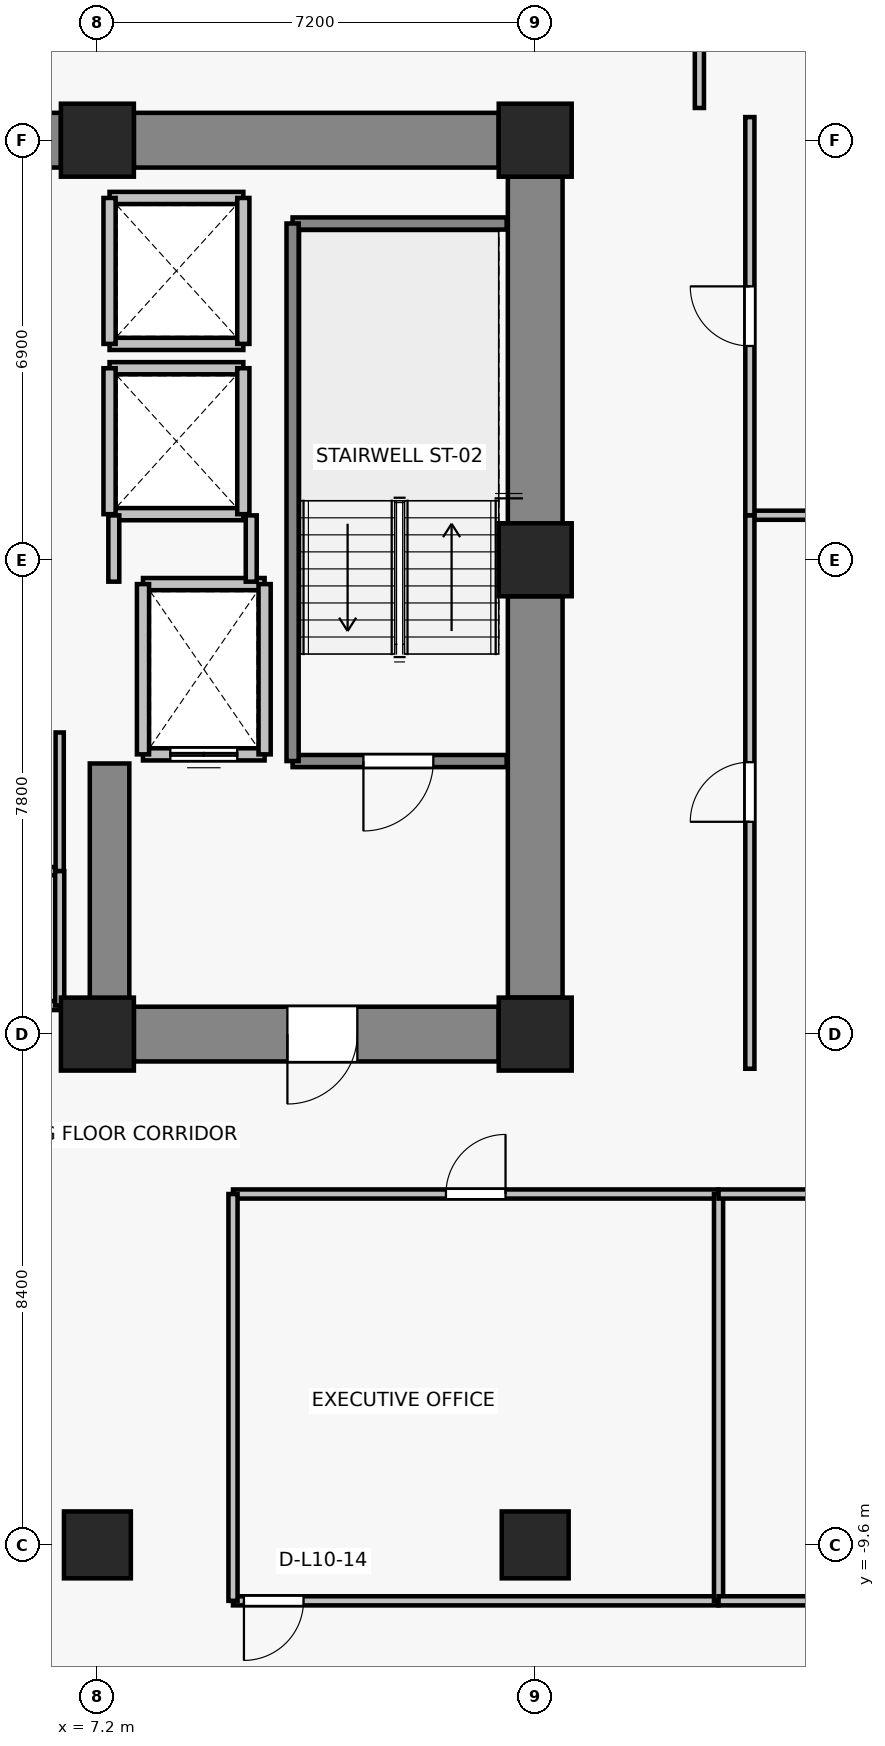
"""IFC4 building model, lengths in metres.
Left out: names, types, materials, properties, quantities, classifications, styles, units other than length and angle.
Written with IfcOpenShell. Run it as: python <this file> out.ifc"""

import sys

from ifc_helpers import new_model, si_unit, direction, frame, frame_2d, origin, origin_2d, place, context, subcontext, project, spatial, rectangle, extrude, source, transform, mapped, element, fill, save


model = new_model("IFC4")
c1 = context("Model", 3, precision=1e-05, world=origin(), true_north=direction((0.0, 1.0)))
c2 = subcontext(c1, "Body", "Model", "MODEL_VIEW")
j1 = project(units=[si_unit("LENGTHUNIT", "METRE"), si_unit("PLANEANGLEUNIT", "RADIAN")], contexts=[c1])
p1 = place(None, origin())
s1 = spatial("IfcSite", under=j1, at=p1, CompositionType="ELEMENT")
p2 = place(p1, origin())
s2 = spatial("IfcBuilding", under=s1, at=p2, CompositionType="ELEMENT")
p3 = place(p2, frame((0.0, 0.0, 40.6)))
s3 = spatial("IfcBuildingStorey", under=s2, at=p3, CompositionType="ELEMENT", Elevation=40.6)
for number, where, z_axis, x_axis in (
    (1, (7.2, -1.2, 0.0), (0.0, 0.0, 1.0), (1.0, 0.0, 0.0)),
    (2, (14.4, -1.2, 0.0), (0.0, 0.0, 1.0), (1.0, 0.0, 0.0)),
    (3, (14.4, 6.6, 0.0), (0.0, 0.0, 1.0), (1.0, 0.0, 0.0)),
    (4, (7.2, 13.5, 0.0), (0.0, 0.0, 1.0), (1.0, 0.0, 0.0)),
    (5, (14.4, 13.5, 0.0), (0.0, 0.0, 1.0), (1.0, 0.0, 0.0)),
):
    element("IfcColumn", number, at=place(p3, frame(where, z_axis=z_axis, x_axis=x_axis)), inside=s3, PredefinedType="COLUMN", context=c2, shape_type="SweptSolid", body=[
        extrude(rectangle(XDim=1.2, YDim=1.2, at=origin_2d()), origin(), (0.0, 0.0, 1.0), 3.3),
    ])
for number, where, z_axis, x_axis in (
    (6, (7.2, -9.6, 0.0), (0.0, 0.0, 1.0), (1.0, 0.0, 0.0)),
    (7, (14.4, -9.6, 0.0), (0.0, 0.0, 1.0), (1.0, 0.0, 0.0)),
):
    element("IfcColumn", number, at=place(p3, frame(where, z_axis=z_axis, x_axis=x_axis)), inside=s3, PredefinedType="COLUMN", context=c2, shape_type="SweptSolid", body=[
        extrude(rectangle(XDim=1.1, YDim=1.1, at=origin_2d()), origin(), (0.0, 0.0, 1.0), 3.3),
    ])
p4 = place(p3, frame((-6.6, 13.5, 0.0), z_axis=(0.0, 0.0, 1.0), x_axis=(1.0, 0.0, 0.0)))
e8 = element("IfcWall", 8, at=p4, inside=s3, PredefinedType="SHEAR", context=c2, shape_type="SweptSolid", body=[
    extrude(rectangle(XDim=13.2, YDim=0.9, at=frame_2d((6.6, 0.0))), origin(), (0.0, 0.0, 1.0), 3.075),
])
p5 = place(p3, frame((7.8, 13.5, 0.0), z_axis=(0.0, 0.0, 1.0), x_axis=(1.0, 0.0, 0.0)))
e9 = element("IfcWall", 9, at=p5, inside=s3, PredefinedType="SHEAR", context=c2, shape_type="SweptSolid", body=[
    extrude(rectangle(XDim=6.0, YDim=0.9, at=frame_2d((3.0, 0.0))), origin(), (0.0, 0.0, 1.0), 3.075),
])
p6 = place(p3, frame((14.4, -0.6, 0.0), z_axis=(0.0, 0.0, 1.0), x_axis=(0.0, 1.0, 0.0)))
e10 = element("IfcWall", 10, at=p6, inside=s3, PredefinedType="SHEAR", context=c2, shape_type="SweptSolid", body=[
    extrude(rectangle(XDim=6.6, YDim=0.9, at=frame_2d((3.3, 0.0))), origin(), (0.0, 0.0, 1.0), 3.075),
])
p7 = place(p3, frame((14.4, 7.2, 0.0), z_axis=(0.0, 0.0, 1.0), x_axis=(0.0, 1.0, 0.0)))
e11 = element("IfcWall", 11, at=p7, inside=s3, PredefinedType="SHEAR", context=c2, shape_type="SweptSolid", body=[
    extrude(rectangle(XDim=5.7, YDim=0.9, at=frame_2d((2.85, 0.0))), origin(), (0.0, 0.0, 1.0), 3.075),
])
p8 = place(p3, frame((13.8, -1.2, 0.0), z_axis=(0.0, 0.0, 1.0), x_axis=(-1.0, 0.0, 0.0)))
e12 = element("IfcWall", 12, at=p8, inside=s3, PredefinedType="SHEAR", context=c2, shape_type="SweptSolid", body=[
    extrude(rectangle(XDim=6.0, YDim=0.9, at=frame_2d((3.0, 0.0))), origin(), (0.0, 0.0, 1.0), 3.075),
])
p9 = place(p8, frame((2.325, 0.0, 0.0)))
e13 = element("IfcOpeningElement", 13, at=p9, cuts=e12, PredefinedType="OPENING", context=c2, shape_type="SweptSolid", body=[
    extrude(rectangle(XDim=1.15, YDim=2.15, at=frame_2d((0.575, 1.075))), frame((0.0, 0.46, 0.0), z_axis=(0.0, -1.0, 0.0), x_axis=(1.0, 0.0, 0.0)), (0.0, 0.0, 1.0), 0.92),
])
p10 = place(p3, frame((7.4, -0.75, 0.0), z_axis=(0.0, 0.0, 1.0), x_axis=(0.0, 1.0, 0.0)))
e14 = element("IfcWall", 14, at=p10, inside=s3, PredefinedType="SHEAR", context=c2, shape_type="SweptSolid", body=[
    extrude(rectangle(XDim=4.0, YDim=0.65, at=frame_2d((2.0, 0.0))), origin(), (0.0, 0.0, 1.0), 3.075),
])
p11 = place(p3, frame((9.95, 3.4, 0.0), z_axis=(0.0, 0.0, 1.0), x_axis=(-1.0, 0.0, 0.0)))
e15 = element("IfcWall", 15, at=p11, inside=s3, PredefinedType="SOLIDWALL", context=c2, shape_type="SweptSolid", body=[
    extrude(rectangle(XDim=2.0, YDim=0.2, at=frame_2d((1.0, 0.0))), origin(), (0.0, 0.0, 1.0), 3.075),
])
p12 = place(p11, frame((0.45, 0.0, 0.0)))
e16 = element("IfcOpeningElement", 16, at=p12, cuts=e15, PredefinedType="OPENING", context=c2, shape_type="SweptSolid", body=[
    extrude(rectangle(XDim=1.1, YDim=2.2, at=frame_2d((0.55, 1.1))), frame((0.0, 0.11, 0.0), z_axis=(0.0, -1.0, 0.0), x_axis=(1.0, 0.0, 0.0)), (0.0, 0.0, 1.0), 0.22),
])
p13 = place(p3, frame((7.95, 6.2, 0.0), z_axis=(0.0, 0.0, 1.0), x_axis=(1.0, 0.0, 0.0)))
e17 = element("IfcWall", 17, at=p13, inside=s3, PredefinedType="SOLIDWALL", context=c2, shape_type="SweptSolid", body=[
    extrude(rectangle(XDim=2.0, YDim=0.2, at=frame_2d((1.0, 0.0))), origin(), (0.0, 0.0, 1.0), 3.075),
])
for number, where, z_axis, x_axis in (
    (18, (7.95, 3.4, 0.0), (0.0, 0.0, 1.0), (0.0, 1.0, 0.0)),
    (19, (9.95, 6.2, 0.0), (0.0, 0.0, 1.0), (0.0, -1.0, 0.0)),
):
    element("IfcWall", number, at=place(p3, frame(where, z_axis=z_axis, x_axis=x_axis)), inside=s3, PredefinedType="SOLIDWALL", context=c2, shape_type="SweptSolid", body=[
        extrude(rectangle(XDim=2.8, YDim=0.2, at=frame_2d((1.4, 0.0))), origin(), (0.0, 0.0, 1.0), 3.075),
    ])
for number, where, z_axis, x_axis in (
    (20, (9.6, 7.35, 0.0), (0.0, 0.0, 1.0), (-1.0, 0.0, 0.0)),
    (21, (7.4, 9.75, 0.0), (0.0, 0.0, 1.0), (1.0, 0.0, 0.0)),
):
    element("IfcWall", number, at=place(p3, frame(where, z_axis=z_axis, x_axis=x_axis)), inside=s3, PredefinedType="SOLIDWALL", context=c2, shape_type="SweptSolid", body=[
        extrude(rectangle(XDim=2.2, YDim=0.2, at=frame_2d((1.1, 0.0))), origin(), (0.0, 0.0, 1.0), 2.465),
    ])
p14 = place(p3, frame((7.4, 7.35, 0.0), z_axis=(0.0, 0.0, 1.0), x_axis=(0.0, 1.0, 0.0)))
e22 = element("IfcWall", 22, at=p14, inside=s3, PredefinedType="SOLIDWALL", context=c2, shape_type="SweptSolid", body=[
    extrude(rectangle(XDim=2.4, YDim=0.2, at=frame_2d((1.2, 0.0))), origin(), (0.0, 0.0, 1.0), 2.465),
])
p15 = place(p3, frame((9.6, 9.75, 0.0), z_axis=(0.0, 0.0, 1.0), x_axis=(0.0, -1.0, 0.0)))
e23 = element("IfcWall", 23, at=p15, inside=s3, PredefinedType="SOLIDWALL", context=c2, shape_type="SweptSolid", body=[
    extrude(rectangle(XDim=2.4, YDim=0.2, at=frame_2d((1.2, 0.0))), origin(), (0.0, 0.0, 1.0), 3.075),
])
for number, where, z_axis, x_axis in (
    (24, (9.6, 10.15, 0.0), (0.0, 0.0, 1.0), (-1.0, 0.0, 0.0)),
    (25, (7.4, 12.55, 0.0), (0.0, 0.0, 1.0), (1.0, 0.0, 0.0)),
):
    element("IfcWall", number, at=place(p3, frame(where, z_axis=z_axis, x_axis=x_axis)), inside=s3, PredefinedType="SOLIDWALL", context=c2, shape_type="SweptSolid", body=[
        extrude(rectangle(XDim=2.2, YDim=0.2, at=frame_2d((1.1, 0.0))), origin(), (0.0, 0.0, 1.0), 2.465),
    ])
p16 = place(p3, frame((7.4, 10.15, 0.0), z_axis=(0.0, 0.0, 1.0), x_axis=(0.0, 1.0, 0.0)))
e26 = element("IfcWall", 26, at=p16, inside=s3, PredefinedType="SOLIDWALL", context=c2, shape_type="SweptSolid", body=[
    extrude(rectangle(XDim=2.4, YDim=0.2, at=frame_2d((1.2, 0.0))), origin(), (0.0, 0.0, 1.0), 2.465),
])
p17 = place(p3, frame((9.6, 12.55, 0.0), z_axis=(0.0, 0.0, 1.0), x_axis=(0.0, -1.0, 0.0)))
e27 = element("IfcWall", 27, at=p17, inside=s3, PredefinedType="SOLIDWALL", context=c2, shape_type="SweptSolid", body=[
    extrude(rectangle(XDim=2.4, YDim=0.2, at=frame_2d((1.2, 0.0))), origin(), (0.0, 0.0, 1.0), 3.075),
])
p18 = place(p3, frame((13.93, 3.29, 0.0), z_axis=(0.0, 0.0, 1.0), x_axis=(-1.0, 0.0, 0.0)))
e28 = element("IfcWall", 28, at=p18, inside=s3, PredefinedType="SOLIDWALL", context=c2, shape_type="SweptSolid", body=[
    extrude(rectangle(XDim=3.52, YDim=0.2, at=frame_2d((1.76, 0.0))), origin(), (0.0, 0.0, 1.0), 3.075),
])
p19 = place(p18, frame((1.205, 0.0, 0.0)))
e29 = element("IfcOpeningElement", 29, at=p19, cuts=e28, PredefinedType="OPENING", context=c2, shape_type="SweptSolid", body=[
    extrude(rectangle(XDim=1.15, YDim=2.15, at=frame_2d((0.575, 1.075))), frame((0.0, 0.11, 0.0), z_axis=(0.0, -1.0, 0.0), x_axis=(1.0, 0.0, 0.0)), (0.0, 0.0, 1.0), 0.22),
])
p20 = place(p3, frame((10.41, 12.13, 0.0), z_axis=(0.0, 0.0, 1.0), x_axis=(1.0, 0.0, 0.0)))
e30 = element("IfcWall", 30, at=p20, inside=s3, PredefinedType="SOLIDWALL", context=c2, shape_type="SweptSolid", body=[
    extrude(rectangle(XDim=3.52, YDim=0.2, at=frame_2d((1.76, 0.0))), origin(), (0.0, 0.0, 1.0), 3.075),
])
p21 = place(p3, frame((10.41, 3.29, 0.0), z_axis=(0.0, 0.0, 1.0), x_axis=(0.0, 1.0, 0.0)))
e31 = element("IfcWall", 31, at=p21, inside=s3, PredefinedType="SOLIDWALL", context=c2, shape_type="SweptSolid", body=[
    extrude(rectangle(XDim=8.84, YDim=0.2, at=frame_2d((4.42, 0.0))), origin(), (0.0, 0.0, 1.0), 3.075),
])
p22 = place(p3, frame((7.47, 6.24, 0.0), z_axis=(0.0, 0.0, 1.0), x_axis=(0.0, 1.0, 0.0)))
e32 = element("IfcWall", 32, at=p22, inside=s3, PredefinedType="PARTITIONING", context=c2, shape_type="SweptSolid", body=[
    extrude(rectangle(XDim=1.09, YDim=0.18, at=frame_2d((0.545, 0.0))), origin(), (0.0, 0.0, 1.0), 2.465),
])
p23 = place(p3, frame((9.73, 7.33, 0.0), z_axis=(0.0, 0.0, 1.0), x_axis=(0.0, -1.0, 0.0)))
e33 = element("IfcWall", 33, at=p23, inside=s3, PredefinedType="PARTITIONING", context=c2, shape_type="SweptSolid", body=[
    extrude(rectangle(XDim=1.09, YDim=0.18, at=frame_2d((0.545, 0.0))), origin(), (0.0, 0.0, 1.0), 3.075),
])
p24 = place(p3, frame((6.58, 1.48, 0.0), z_axis=(0.0, 0.0, 1.0), x_axis=(-1.0, 0.0, 0.0)))
e34 = element("IfcWall", 34, at=p24, inside=s3, PredefinedType="PARTITIONING", context=c2, shape_type="SweptSolid", body=[
    extrude(rectangle(XDim=5.11, YDim=0.135, at=frame_2d((2.555, 0.0))), origin(), (0.0, 0.0, 1.0), 3.075),
])
p25 = place(p3, frame((6.58, 3.76, 0.0), z_axis=(0.0, 0.0, 1.0), x_axis=(0.0, -1.0, 0.0)))
e35 = element("IfcWall", 35, at=p25, inside=s3, PredefinedType="PARTITIONING", context=c2, shape_type="SweptSolid", body=[
    extrude(rectangle(XDim=2.28, YDim=0.135, at=frame_2d((1.14, 0.0))), origin(), (0.0, 0.0, 1.0), 3.075),
])
p26 = place(p3, frame((6.58, -0.73, 0.0), z_axis=(0.0, 0.0, 1.0), x_axis=(-1.0, 0.0, 0.0)))
e36 = element("IfcWall", 36, at=p26, inside=s3, PredefinedType="PARTITIONING", context=c2, shape_type="SweptSolid", body=[
    extrude(rectangle(XDim=2.4, YDim=0.15, at=frame_2d((1.2, 0.0))), origin(), (0.0, 0.0, 1.0), 3.075),
])
p27 = place(p26, frame((0.76, 0.0, 0.0)))
e37 = element("IfcOpeningElement", 37, at=p27, cuts=e36, PredefinedType="OPENING", context=c2, shape_type="SweptSolid", body=[
    extrude(rectangle(XDim=0.88, YDim=2.1, at=frame_2d((0.44, 1.05))), frame((0.0, 0.085, 0.0), z_axis=(0.0, -1.0, 0.0), x_axis=(1.0, 0.0, 0.0)), (0.0, 0.0, 1.0), 0.17),
])
p28 = place(p3, frame((6.58, 1.48, 0.0), z_axis=(0.0, 0.0, 1.0), x_axis=(0.0, -1.0, 0.0)))
e38 = element("IfcWall", 38, at=p28, inside=s3, PredefinedType="PARTITIONING", context=c2, shape_type="SweptSolid", body=[
    extrude(rectangle(XDim=2.21, YDim=0.15, at=frame_2d((1.105, 0.0))), origin(), (0.0, 0.0, 1.0), 3.075),
])
p29 = place(p3, frame((17.415, -10.52, 0.0), z_axis=(0.0, 0.0, 1.0), x_axis=(-1.0, 0.0, 0.0)))
e39 = element("IfcWall", 39, at=p29, inside=s3, PredefinedType="PARTITIONING", context=c2, shape_type="SweptSolid", body=[
    extrude(rectangle(XDim=7.985, YDim=0.15, at=frame_2d((3.993, 0.0))), origin(), (0.0, 0.0, 1.0), 2.465),
])
p30 = place(p29, frame((6.825, 0.0, 0.0)))
e40 = element("IfcOpeningElement", 40, at=p30, cuts=e39, PredefinedType="OPENING", context=c2, shape_type="SweptSolid", body=[
    extrude(rectangle(XDim=0.98, YDim=2.15, at=frame_2d((0.49, 1.075))), frame((0.0, 0.085, 0.0), z_axis=(0.0, -1.0, 0.0), x_axis=(1.0, 0.0, 0.0)), (0.0, 0.0, 1.0), 0.17),
])
p31 = place(p3, frame((9.43, -3.83, 0.0), z_axis=(0.0, 0.0, 1.0), x_axis=(1.0, 0.0, 0.0)))
e41 = element("IfcWall", 41, at=p31, inside=s3, PredefinedType="PARTITIONING", context=c2, shape_type="SweptSolid", body=[
    extrude(rectangle(XDim=7.985, YDim=0.15, at=frame_2d((3.993, 0.0))), origin(), (0.0, 0.0, 1.0), 2.465),
])
p32 = place(p31, frame((3.502, 0.0, 0.0)))
e42 = element("IfcOpeningElement", 42, at=p32, cuts=e41, PredefinedType="OPENING", context=c2, shape_type="SweptSolid", body=[
    extrude(rectangle(XDim=0.98, YDim=2.15, at=frame_2d((0.49, 1.075))), frame((0.0, 0.085, 0.0), z_axis=(0.0, -1.0, 0.0), x_axis=(1.0, 0.0, 0.0)), (0.0, 0.0, 1.0), 0.17),
])
for number, where, z_axis, x_axis in (
    (43, (9.43, -10.52, 0.0), (0.0, 0.0, 1.0), (0.0, 1.0, 0.0)),
    (44, (17.415, -3.83, 0.0), (0.0, 0.0, 1.0), (0.0, -1.0, 0.0)),
):
    element("IfcWall", number, at=place(p3, frame(where, z_axis=z_axis, x_axis=x_axis)), inside=s3, PredefinedType="PARTITIONING", context=c2, shape_type="SweptSolid", body=[
        extrude(rectangle(XDim=6.69, YDim=0.15, at=frame_2d((3.345, 0.0))), origin(), (0.0, 0.0, 1.0), 2.465),
    ])
p33 = place(p3, frame((28.53, -10.52, 0.0), z_axis=(0.0, 0.0, 1.0), x_axis=(-1.0, 0.0, 0.0)))
e45 = element("IfcWall", 45, at=p33, inside=s3, PredefinedType="PARTITIONING", context=c2, shape_type="SweptSolid", body=[
    extrude(rectangle(XDim=11.115, YDim=0.15, at=frame_2d((5.558, 0.0))), origin(), (0.0, 0.0, 1.0), 2.465),
])
p34 = place(p3, frame((17.415, -3.83, 0.0), z_axis=(0.0, 0.0, 1.0), x_axis=(1.0, 0.0, 0.0)))
e46 = element("IfcWall", 46, at=p34, inside=s3, PredefinedType="PARTITIONING", context=c2, shape_type="SweptSolid", body=[
    extrude(rectangle(XDim=11.115, YDim=0.15, at=frame_2d((5.558, 0.0))), origin(), (0.0, 0.0, 1.0), 2.465),
])
p35 = place(p34, frame((3.343, 0.0, 0.0)))
e47 = element("IfcOpeningElement", 47, at=p35, cuts=e46, PredefinedType="OPENING", context=c2, shape_type="SweptSolid", body=[
    extrude(rectangle(XDim=0.98, YDim=2.15, at=frame_2d((0.49, 1.075))), frame((0.0, 0.085, 0.0), z_axis=(0.0, -1.0, 0.0), x_axis=(1.0, 0.0, 0.0)), (0.0, 0.0, 1.0), 0.17),
])
p36 = place(p3, frame((17.93, 7.333, 0.0), z_axis=(0.0, 0.0, 1.0), x_axis=(1.0, 0.0, 0.0)))
e48 = element("IfcWall", 48, at=p36, inside=s3, PredefinedType="PARTITIONING", context=c2, shape_type="SweptSolid", body=[
    extrude(rectangle(XDim=10.6, YDim=0.15, at=frame_2d((5.3, 0.0))), origin(), (0.0, 0.0, 1.0), 2.465),
])
p37 = place(p3, frame((17.93, -1.77, 0.0), z_axis=(0.0, 0.0, 1.0), x_axis=(0.0, 1.0, 0.0)))
e49 = element("IfcWall", 49, at=p37, inside=s3, PredefinedType="PARTITIONING", context=c2, shape_type="SweptSolid", body=[
    extrude(rectangle(XDim=9.103, YDim=0.15, at=frame_2d((4.551, 0.0))), origin(), (0.0, 0.0, 1.0), 2.465),
])
p38 = place(p37, frame((4.061, 0.0, 0.0)))
e50 = element("IfcOpeningElement", 50, at=p38, cuts=e49, PredefinedType="OPENING", context=c2, shape_type="SweptSolid", body=[
    extrude(rectangle(XDim=0.98, YDim=2.15, at=frame_2d((0.49, 1.075))), frame((0.0, 0.085, 0.0), z_axis=(0.0, -1.0, 0.0), x_axis=(1.0, 0.0, 0.0)), (0.0, 0.0, 1.0), 0.17),
])
p39 = place(p3, frame((17.93, 7.333, 0.0), z_axis=(0.0, 0.0, 1.0), x_axis=(0.0, 1.0, 0.0)))
e51 = element("IfcWall", 51, at=p39, inside=s3, PredefinedType="PARTITIONING", context=c2, shape_type="SweptSolid", body=[
    extrude(rectangle(XDim=6.547, YDim=0.15, at=frame_2d((3.274, 0.0))), origin(), (0.0, 0.0, 1.0), 2.465),
])
p40 = place(p39, frame((2.783, 0.0, 0.0)))
e52 = element("IfcOpeningElement", 52, at=p40, cuts=e51, PredefinedType="OPENING", context=c2, shape_type="SweptSolid", body=[
    extrude(rectangle(XDim=0.98, YDim=2.15, at=frame_2d((0.49, 1.075))), frame((0.0, 0.085, 0.0), z_axis=(0.0, -1.0, 0.0), x_axis=(1.0, 0.0, 0.0)), (0.0, 0.0, 1.0), 0.17),
])
p41 = place(p3, frame((17.1, 18.13, 0.0), z_axis=(0.0, 0.0, 1.0), x_axis=(0.0, -1.0, 0.0)))
e53 = element("IfcWall", 53, at=p41, inside=s3, PredefinedType="PARTITIONING", context=c2, shape_type="SweptSolid", body=[
    extrude(rectangle(XDim=4.1, YDim=0.15, at=frame_2d((2.05, 0.0))), origin(), (0.0, 0.0, 1.0), 2.465),
])
m1 = source(origin(), c2, "Body", "SweptSolid", [
    extrude(rectangle(XDim=1.1, YDim=2.2, at=frame_2d((0.55, 1.1))), frame((0.0, 0.025, 0.0), z_axis=(0.0, -1.0, 0.0), x_axis=(1.0, 0.0, 0.0)), (0.0, 0.0, 1.0), 0.05),
])
p42 = place(p12, origin())
e54 = element("IfcDoor", 54, at=p42, inside=s3, OperationType="DOUBLE_DOOR_SLIDING", PredefinedType="DOOR", context=c2, shape_type="MappedRepresentation", body=[
    mapped(m1, transform((0.0, 0.0, 0.0), x_axis=(1.0, 0.0, 0.0), y_axis=(0.0, 1.0, 0.0), z_axis=(0.0, 0.0, 1.0), scale=1.0)),
])
fill(e16, e54)
m2 = source(origin(), c2, "Body", "SweptSolid", [
    extrude(rectangle(XDim=1.15, YDim=2.15, at=frame_2d((0.575, 1.075))), frame((0.0, 0.025, 0.0), z_axis=(0.0, -1.0, 0.0), x_axis=(1.0, 0.0, 0.0)), (0.0, 0.0, 1.0), 0.05),
])
p43 = place(p19, origin())
e55 = element("IfcDoor", 55, at=p43, inside=s3, OperationType="SINGLE_SWING_RIGHT", PredefinedType="DOOR", context=c2, shape_type="MappedRepresentation", body=[
    mapped(m2, transform((0.0, 0.0, 0.0), x_axis=(1.0, 0.0, 0.0), y_axis=(0.0, 1.0, 0.0), z_axis=(0.0, 0.0, 1.0), scale=1.0)),
])
fill(e29, e55)
p44 = place(p9, origin())
e56 = element("IfcDoor", 56, at=p44, inside=s3, OperationType="SINGLE_SWING_RIGHT", PredefinedType="DOOR", context=c2, shape_type="MappedRepresentation", body=[
    mapped(m2, transform((0.0, 0.0, 0.0), x_axis=(1.0, 0.0, 0.0), y_axis=(0.0, 1.0, 0.0), z_axis=(0.0, 0.0, 1.0), scale=1.0)),
])
fill(e13, e56)
m3 = source(origin(), c2, "Body", "SweptSolid", [
    extrude(rectangle(XDim=0.98, YDim=2.15, at=frame_2d((0.49, 1.075))), frame((0.0, 0.025, 0.0), z_axis=(0.0, -1.0, 0.0), x_axis=(1.0, 0.0, 0.0)), (0.0, 0.0, 1.0), 0.05),
])
p45 = place(p32, origin())
e57 = element("IfcDoor", 57, at=p45, inside=s3, OperationType="SINGLE_SWING_RIGHT", PredefinedType="DOOR", context=c2, shape_type="MappedRepresentation", body=[
    mapped(m3, transform((0.0, 0.0, 0.0), x_axis=(1.0, 0.0, 0.0), y_axis=(0.0, 1.0, 0.0), z_axis=(0.0, 0.0, 1.0), scale=1.0)),
])
fill(e42, e57)
p46 = place(p30, origin())
e58 = element("IfcDoor", 58, at=p46, inside=s3, OperationType="SINGLE_SWING_RIGHT", PredefinedType="DOOR", context=c2, shape_type="MappedRepresentation", body=[
    mapped(m3, transform((0.0, 0.0, 0.0), x_axis=(1.0, 0.0, 0.0), y_axis=(0.0, 1.0, 0.0), z_axis=(0.0, 0.0, 1.0), scale=1.0)),
])
fill(e40, e58)
p47 = place(p38, origin())
e59 = element("IfcDoor", 59, at=p47, inside=s3, OperationType="SINGLE_SWING_LEFT", PredefinedType="DOOR", context=c2, shape_type="MappedRepresentation", body=[
    mapped(m3, transform((0.0, 0.0, 0.0), x_axis=(1.0, 0.0, 0.0), y_axis=(0.0, 1.0, 0.0), z_axis=(0.0, 0.0, 1.0), scale=1.0)),
])
fill(e50, e59)
p48 = place(p40, origin())
e60 = element("IfcDoor", 60, at=p48, inside=s3, OperationType="SINGLE_SWING_RIGHT", PredefinedType="DOOR", context=c2, shape_type="MappedRepresentation", body=[
    mapped(m3, transform((0.0, 0.0, 0.0), x_axis=(1.0, 0.0, 0.0), y_axis=(0.0, 1.0, 0.0), z_axis=(0.0, 0.0, 1.0), scale=1.0)),
])
fill(e52, e60)
save(model, sys.argv[1])
